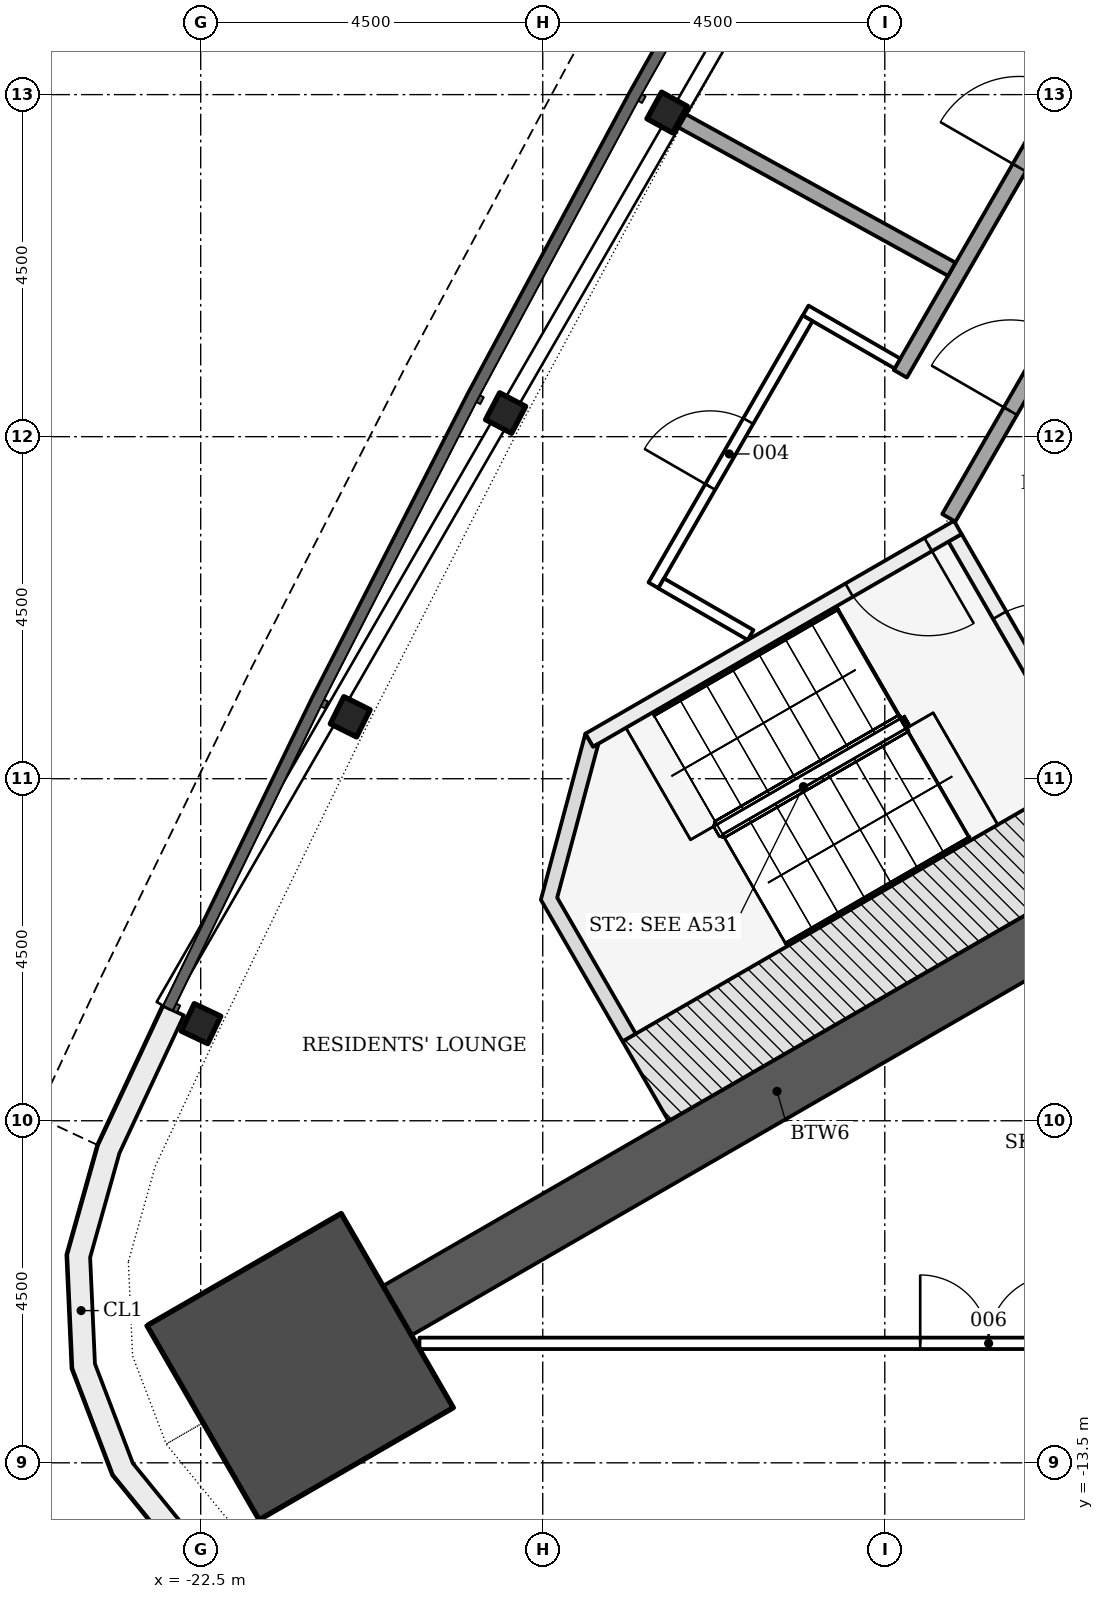
"""IFC4 building model, lengths in metres.
Left out: names, types, materials, properties, quantities, classifications, styles, units other than length and angle.
Written with IfcOpenShell. Run it as: python <this file> out.ifc"""

import sys

from ifc_helpers import new_model, si_unit, direction, frame, frame_2d, origin, origin_2d, place, context, subcontext, project, spatial, polyline, rectangle, i_section, outline, extrude, element, fill, save


model = new_model("IFC4")
c1 = context("Model", 3, precision=1e-05, world=origin(), true_north=direction((0.0, 1.0)))
c2 = subcontext(c1, "Body", "Model", "MODEL_VIEW")
j1 = project(units=[si_unit("LENGTHUNIT", "METRE"), si_unit("PLANEANGLEUNIT", "RADIAN")], contexts=[c1])
p1 = place(None, origin())
s1 = spatial("IfcSite", under=j1, at=p1, CompositionType="ELEMENT")
p2 = place(p1, origin())
s2 = spatial("IfcBuilding", under=s1, at=p2, CompositionType="ELEMENT")
p3 = place(p2, frame((0.0, 0.0, 134.7)))
s3 = spatial("IfcBuildingStorey", under=s2, at=p3, CompositionType="ELEMENT", Elevation=134.7)
p4 = place(p3, frame((-9.922, -5.728, -0.3), z_axis=(0.0, 0.0, 1.0), x_axis=(-0.866024913782, -0.500000848707, 0.0)))
e1 = element("IfcWall", 1, at=p4, inside=s3, PredefinedType="SHEAR", context=c2, shape_type="SweptSolid", body=[
    extrude(rectangle(XDim=11.539, YDim=0.75, at=frame_2d((5.769, 0.0))), origin(), (0.0, 0.0, 1.0), 5.5),
])
p5 = place(p3, frame((-21.192, -12.235, -0.3), z_axis=(0.0, 0.0, 1.0), x_axis=(-0.866025403784, -0.5, 0.0)))
e2 = element("IfcColumn", 2, at=p5, inside=s3, PredefinedType="COLUMN", context=c2, shape_type="SweptSolid", body=[
    extrude(rectangle(XDim=2.95, YDim=2.95, at=origin_2d()), origin(), (0.0, 0.0, 1.0), 5.5),
])
for number, where, z_axis, x_axis in (
    (3, (-16.364, 4.265, -0.3), (0.0, 0.0, 1.0), (-0.482, -0.876, 0.0)),
    (4, (-18.489, 0.311, -0.3), (0.0, 0.0, 1.0), (-0.464, -0.886, 0.0)),
    (5, (-20.533, -3.686, -0.3), (0.0, 0.0, 1.0), (-0.446, -0.895, 0.0)),
    (6, (-22.496, -7.722, -0.3), (0.0, 0.0, 1.0), (-0.428, -0.904, 0.0)),
):
    element("IfcColumn", number, at=place(p3, frame(where, z_axis=z_axis, x_axis=x_axis)), inside=s3, PredefinedType="COLUMN", context=c2, shape_type="SweptSolid", body=[
        extrude(i_section(OverallWidth=0.399, OverallDepth=0.386, WebThickness=0.021, FlangeThickness=0.033, FilletRadius=0.015, at=origin_2d()), origin(), (0.0, 0.0, 1.0), 5.5),
    ])
p6 = place(p3, origin())
e7 = element("IfcWall", 7, at=p6, inside=s3, PredefinedType="NOTDEFINED", context=c2, shape_type="SweptSolid", body=[
    extrude(outline(polyline([(-22.993, -7.487), (-23.852, -9.322), (-24.257, -10.763), (-24.189, -12.259), (-23.656, -13.658), (-22.711, -14.819), (-21.449, -15.625), (-19.999, -15.995), (-17.98, -16.169), (-17.955, -15.87), (-19.948, -15.699), (-21.328, -15.347), (-22.509, -14.592), (-23.393, -13.506), (-23.891, -12.197), (-23.955, -10.798), (-23.57, -9.426), (-22.721, -7.614), (-22.993, -7.487)])), origin(), (0.0, 0.0, 1.0), 5.2),
])
p7 = place(p3, frame((-12.576, -1.331, -0.3), z_axis=(0.0, 0.0, 1.0), x_axis=(0.499970499736, -0.8660424351, 0.0)))
e8 = element("IfcWall", 8, at=p7, inside=s3, PredefinedType="SHEAR", context=c2, shape_type="SweptSolid", body=[
    extrude(rectangle(XDim=3.55, YDim=0.2, at=frame_2d((1.775, 0.0))), origin(), (0.0, 0.0, 1.0), 5.5),
])
p8 = place(p7, frame((1.175, 0.0, 0.3)))
e9 = element("IfcOpeningElement", 9, at=p8, cuts=e8, PredefinedType="OPENING", context=c2, shape_type="SweptSolid", body=[
    extrude(rectangle(XDim=1.2, YDim=2.1, at=frame_2d((0.6, 1.05))), frame((0.0, 0.11, 0.0), z_axis=(0.0, -1.0, 0.0), x_axis=(1.0, 0.0, 0.0)), (0.0, 0.0, 1.0), 0.22),
])
p9 = place(p3, frame((-12.539, -1.194, -0.3), z_axis=(0.0, 0.0, 1.0), x_axis=(-0.866045472092, -0.499965239061, 0.0)))
e10 = element("IfcWall", 10, at=p9, inside=s3, PredefinedType="SHEAR", context=c2, shape_type="SweptSolid", body=[
    extrude(rectangle(XDim=5.6, YDim=0.2, at=frame_2d((2.8, 0.0))), origin(), (0.0, 0.0, 1.0), 5.5),
])
p10 = place(p9, frame((0.45, 0.0, 0.3)))
e11 = element("IfcOpeningElement", 11, at=p10, cuts=e10, PredefinedType="OPENING", context=c2, shape_type="SweptSolid", body=[
    extrude(rectangle(XDim=1.2, YDim=2.1, at=frame_2d((0.6, 1.05))), frame((0.0, 0.11, 0.0), z_axis=(0.0, -1.0, 0.0), x_axis=(1.0, 0.0, 0.0)), (0.0, 0.0, 1.0), 0.22),
])
p11 = place(p3, frame((-10.412, -4.879, -0.3), z_axis=(0.0, 0.0, 1.0), x_axis=(-0.866026919366, -0.499997374926, 0.0)))
e12 = element("IfcWall", 12, at=p11, inside=s3, PredefinedType="SHEAR", context=c2, shape_type="SweptSolid", body=[
    extrude(rectangle(XDim=7.2, YDim=1.211, at=frame_2d((3.6, 0.0))), origin(), (0.0, 0.0, 1.0), 5.5),
])
p12 = place(p3, frame((0.0, 0.0, -0.3)))
e13 = element("IfcWall", 13, at=p12, inside=s3, PredefinedType="SHEAR", context=c2, shape_type="SweptSolid", body=[
    extrude(outline(polyline([(-17.439, -3.907), (-18.025, -6.093), (-16.95, -7.955), (-16.777, -7.855), (-17.81, -6.065), (-17.267, -4.039), (-17.339, -4.081), (-17.339, -4.081), (-17.339, -4.081), (-17.339, -4.081), (-17.339, -4.081), (-17.339, -4.081), (-17.339, -4.081), (-17.339, -4.081), (-17.339, -4.081), (-17.339, -4.081), (-17.339, -4.081), (-17.339, -4.081), (-17.339, -4.081), (-17.339, -4.081), (-17.339, -4.081), (-17.339, -4.081), (-17.339, -4.081), (-17.439, -3.907)])), origin(), (0.0, 0.0, 1.0), 5.5),
])
p13 = place(p3, frame((-12.658, -1.068, 0.0), z_axis=(0.0, 0.0, 1.0), x_axis=(0.499996073327, 0.866027670838, 0.0)))
e14 = element("IfcWall", 14, at=p13, inside=s3, PredefinedType="PARTITIONING", context=c2, shape_type="SweptSolid", body=[
    extrude(rectangle(XDim=7.904, YDim=0.2, at=frame_2d((3.952, 0.0))), origin(), (0.0, 0.0, 1.0), 4.647),
])
p14 = place(p13, frame((1.621, 0.0, 0.0)))
e15 = element("IfcOpeningElement", 15, at=p14, cuts=e14, PredefinedType="OPENING", context=c2, shape_type="SweptSolid", body=[
    extrude(rectangle(XDim=1.2, YDim=2.1, at=frame_2d((0.6, 1.05))), frame((0.0, 0.11, 0.0), z_axis=(0.0, -1.0, 0.0), x_axis=(1.0, 0.0, 0.0)), (0.0, 0.0, 1.0), 0.22),
])
p15 = place(p3, frame((-13.296, 0.827, 0.0), z_axis=(0.0, 0.0, 1.0), x_axis=(0.499999658466, 0.866025600969, 0.0)))
e16 = element("IfcWall", 16, at=p15, inside=s3, PredefinedType="PARTITIONING", context=c2, shape_type="SweptSolid", body=[
    extrude(rectangle(XDim=25.54, YDim=0.2, at=frame_2d((12.77, 0.0))), origin(), (0.0, 0.0, 1.0), 4.647),
])
p16 = place(p15, frame((17.363, 0.0, 0.0)))
e17 = element("IfcOpeningElement", 17, at=p16, cuts=e16, PredefinedType="OPENING", context=c2, shape_type="SweptSolid", body=[
    extrude(rectangle(XDim=1.0, YDim=2.1, at=frame_2d((0.5, 1.05))), frame((0.0, 0.11, 0.0), z_axis=(0.0, -1.0, 0.0), x_axis=(1.0, 0.0, 0.0)), (0.0, 0.0, 1.0), 0.22),
])
p17 = place(p15, frame((7.528, 0.0, 0.0)))
e18 = element("IfcOpeningElement", 18, at=p17, cuts=e16, PredefinedType="OPENING", context=c2, shape_type="SweptSolid", body=[
    extrude(rectangle(XDim=1.0, YDim=2.1, at=frame_2d((0.5, 1.05))), frame((0.0, 0.11, 0.0), z_axis=(0.0, -1.0, 0.0), x_axis=(1.0, 0.0, 0.0)), (0.0, 0.0, 1.0), 0.22),
])
p18 = place(p15, frame((3.132, 0.0, 0.0)))
e19 = element("IfcOpeningElement", 19, at=p18, cuts=e16, PredefinedType="OPENING", context=c2, shape_type="SweptSolid", body=[
    extrude(rectangle(XDim=1.2, YDim=2.1, at=frame_2d((0.6, 1.05))), frame((0.0, 0.11, 0.0), z_axis=(0.0, -1.0, 0.0), x_axis=(1.0, 0.0, 0.0)), (0.0, 0.0, 1.0), 0.22),
])
p19 = place(p3, frame((-16.232, 4.192, 0.0), z_axis=(0.0, 0.0, 1.0), x_axis=(0.876013353415, -0.482286848917, 0.0)))
e20 = element("IfcWall", 20, at=p19, inside=s3, PredefinedType="PARTITIONING", context=c2, shape_type="SweptSolid", body=[
    extrude(rectangle(XDim=4.124, YDim=0.2, at=frame_2d((2.062, 0.0))), origin(), (0.0, 0.0, 1.0), 4.647),
])
p20 = place(p3, frame((-13.333, 0.962, 0.0), z_axis=(0.0, 0.0, 1.0), x_axis=(-0.865961103467, 0.500111354883, 0.0)))
e21 = element("IfcWall", 21, at=p20, inside=s3, PredefinedType="PARTITIONING", context=c2, shape_type="SweptSolid", body=[
    extrude(rectangle(XDim=1.395, YDim=0.15, at=frame_2d((0.697, 0.0))), origin(), (0.0, 0.0, 1.0), 5.2),
])
p21 = place(p3, frame((-16.544, -1.955, 0.0), z_axis=(0.0, 0.0, 1.0), x_axis=(0.499996823547, 0.866027237703, 0.0)))
e22 = element("IfcWall", 22, at=p21, inside=s3, PredefinedType="PARTITIONING", context=c2, shape_type="SweptSolid", body=[
    extrude(rectangle(XDim=4.057, YDim=0.15, at=frame_2d((2.028, 0.0))), origin(), (0.0, 0.0, 1.0), 4.723),
])
p22 = place(p21, frame((1.495, 0.0, 0.0)))
e23 = element("IfcOpeningElement", 23, at=p22, cuts=e22, PredefinedType="OPENING", context=c2, shape_type="SweptSolid", body=[
    extrude(rectangle(XDim=1.0, YDim=2.1, at=frame_2d((0.5, 1.05))), frame((0.0, 0.085, 0.0), z_axis=(0.0, -1.0, 0.0), x_axis=(1.0, 0.0, 0.0)), (0.0, 0.0, 1.0), 0.17),
])
p23 = place(p3, frame((-16.443, -1.93, 0.0), z_axis=(0.0, 0.0, 1.0), x_axis=(0.866056956396, -0.499945345291, 0.0)))
e24 = element("IfcWall", 24, at=p23, inside=s3, PredefinedType="PARTITIONING", context=c2, shape_type="SweptSolid", body=[
    extrude(rectangle(XDim=1.359, YDim=0.15, at=frame_2d((0.68, 0.0))), origin(), (0.0, 0.0, 1.0), 5.2),
])
p24 = place(p3, frame((-19.622, -11.928, 0.0), z_axis=(0.0, 0.0, 1.0), x_axis=(1.0, 0.0, 0.0)))
e25 = element("IfcWall", 25, at=p24, inside=s3, PredefinedType="PARTITIONING", context=c2, shape_type="SweptSolid", body=[
    extrude(rectangle(XDim=25.529, YDim=0.15, at=frame_2d((12.764, 0.0))), origin(), (0.0, 0.0, 1.0), 4.647),
])
p25 = place(p24, frame((6.588, 0.0, 0.0)))
e26 = element("IfcOpeningElement", 26, at=p25, cuts=e25, PredefinedType="OPENING", context=c2, shape_type="SweptSolid", body=[
    extrude(rectangle(XDim=1.8, YDim=2.1, at=frame_2d((0.9, 1.05))), frame((0.0, 0.085, 0.0), z_axis=(0.0, -1.0, 0.0), x_axis=(1.0, 0.0, 0.0)), (0.0, 0.0, 1.0), 0.17),
])
p26 = place(p24, frame((17.026, 0.0, 0.0)))
e27 = element("IfcOpeningElement", 27, at=p26, cuts=e25, PredefinedType="OPENING", context=c2, shape_type="SweptSolid", body=[
    extrude(rectangle(XDim=1.0, YDim=2.1, at=frame_2d((0.5, 1.05))), frame((0.0, 0.085, 0.0), z_axis=(0.0, -1.0, 0.0), x_axis=(1.0, 0.0, 0.0)), (0.0, 0.0, 1.0), 0.17),
])
p27 = place(p24, frame((21.426, 0.0, 0.0)))
e28 = element("IfcOpeningElement", 28, at=p27, cuts=e25, PredefinedType="OPENING", context=c2, shape_type="SweptSolid", body=[
    extrude(rectangle(XDim=1.0, YDim=2.1, at=frame_2d((0.5, 1.05))), frame((0.0, 0.085, 0.0), z_axis=(0.0, -1.0, 0.0), x_axis=(1.0, 0.0, 0.0)), (0.0, 0.0, 1.0), 0.17),
])
p28 = place(p8, origin())
e29 = element("IfcDoor", 29, at=p28, inside=s3, OperationType="SINGLE_SWING_RIGHT", PredefinedType="DOOR", context=c2, shape_type="SweptSolid", body=[
    extrude(rectangle(XDim=1.2, YDim=2.1, at=frame_2d((0.6, 1.05))), frame((0.0, 0.025, 0.0), z_axis=(0.0, -1.0, 0.0), x_axis=(1.0, 0.0, 0.0)), (0.0, 0.0, 1.0), 0.05),
])
fill(e9, e29)
p29 = place(p10, origin())
e30 = element("IfcDoor", 30, at=p29, inside=s3, OperationType="SINGLE_SWING_LEFT", PredefinedType="DOOR", context=c2, shape_type="SweptSolid", body=[
    extrude(rectangle(XDim=1.2, YDim=2.1, at=frame_2d((0.6, 1.05))), frame((0.0, 0.025, 0.0), z_axis=(0.0, -1.0, 0.0), x_axis=(1.0, 0.0, 0.0)), (0.0, 0.0, 1.0), 0.05),
])
fill(e11, e30)
p30 = place(p18, origin())
e31 = element("IfcDoor", 31, at=p30, inside=s3, OperationType="SINGLE_SWING_LEFT", PredefinedType="DOOR", context=c2, shape_type="SweptSolid", body=[
    extrude(rectangle(XDim=1.2, YDim=2.1, at=frame_2d((0.6, 1.05))), frame((0.0, 0.025, 0.0), z_axis=(0.0, -1.0, 0.0), x_axis=(1.0, 0.0, 0.0)), (0.0, 0.0, 1.0), 0.05),
])
fill(e19, e31)
p31 = place(p22, origin())
e32 = element("IfcDoor", 32, at=p31, inside=s3, OperationType="SINGLE_SWING_LEFT", PredefinedType="DOOR", context=c2, shape_type="SweptSolid", body=[
    extrude(rectangle(XDim=1.0, YDim=2.1, at=frame_2d((0.5, 1.05))), frame((0.0, 0.025, 0.0), z_axis=(0.0, -1.0, 0.0), x_axis=(1.0, 0.0, 0.0)), (0.0, 0.0, 1.0), 0.05),
])
fill(e23, e32)
p32 = place(p14, origin())
e33 = element("IfcDoor", 33, at=p32, inside=s3, OperationType="SINGLE_SWING_LEFT", PredefinedType="DOOR", context=c2, shape_type="SweptSolid", body=[
    extrude(rectangle(XDim=1.2, YDim=2.1, at=frame_2d((0.6, 1.05))), frame((0.0, 0.025, 0.0), z_axis=(0.0, -1.0, 0.0), x_axis=(1.0, 0.0, 0.0)), (0.0, 0.0, 1.0), 0.05),
])
fill(e15, e33)
p33 = place(p25, origin())
e34 = element("IfcDoor", 34, at=p33, inside=s3, OperationType="DOUBLE_DOOR_SINGLE_SWING", PredefinedType="DOOR", context=c2, shape_type="SweptSolid", body=[
    extrude(rectangle(XDim=1.8, YDim=2.1, at=frame_2d((0.9, 1.05))), frame((0.0, 0.025, 0.0), z_axis=(0.0, -1.0, 0.0), x_axis=(1.0, 0.0, 0.0)), (0.0, 0.0, 1.0), 0.05),
])
fill(e26, e34)
save(model, sys.argv[1])
